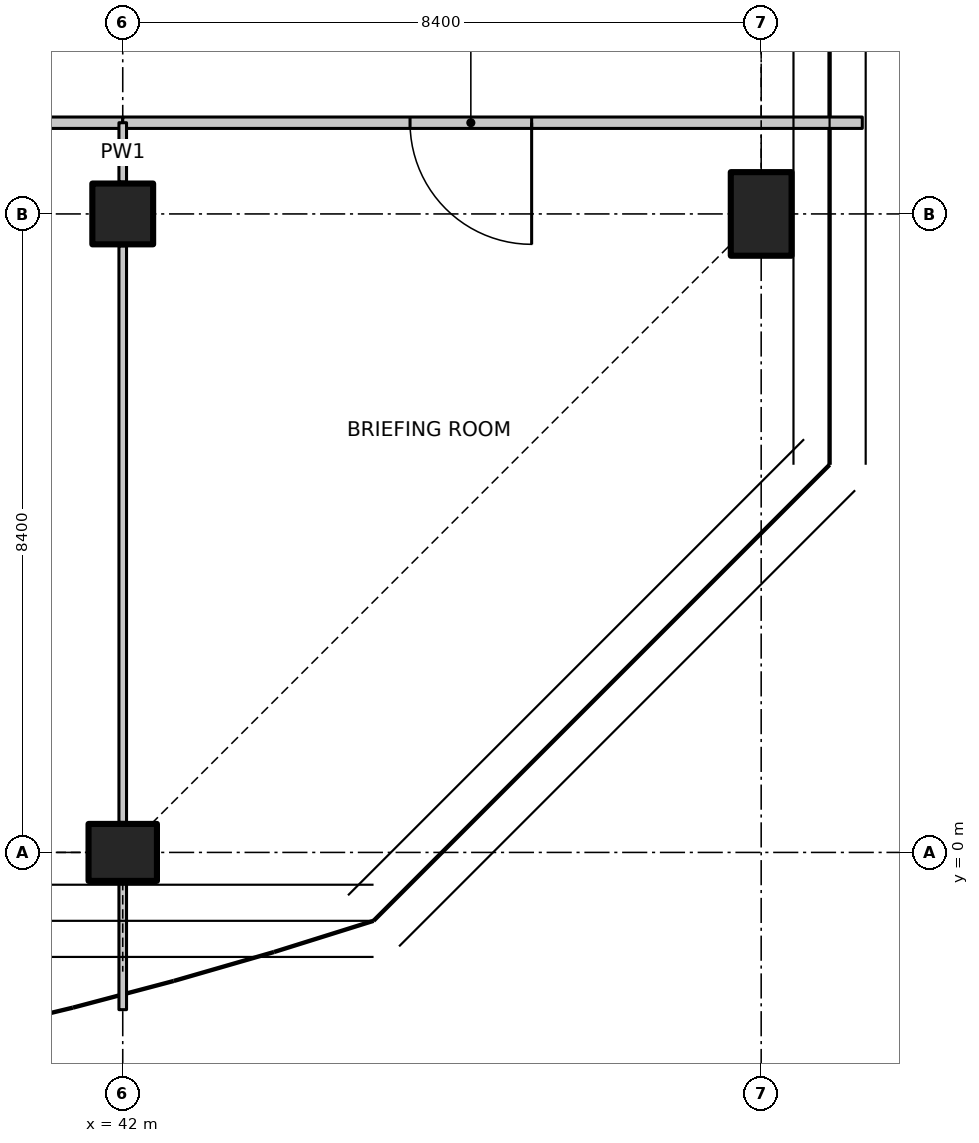
"""IFC4 building model, lengths in metres.
Left out: names, types, materials, properties, quantities, classifications, styles, units other than length and angle.
Written with IfcOpenShell. Run it as: python <this file> out.ifc"""

import sys

from ifc_helpers import new_model, si_unit, direction, frame, frame_2d, origin, origin_2d, place, context, subcontext, project, spatial, polyline, rectangle, outline, extrude, element, fill, save


model = new_model("IFC4")
c1 = context("Model", 3, precision=1e-05, world=origin(), true_north=direction((0.0, 1.0)))
c2 = subcontext(c1, "Body", "Model", "MODEL_VIEW")
j1 = project(units=[si_unit("LENGTHUNIT", "METRE"), si_unit("PLANEANGLEUNIT", "RADIAN")], contexts=[c1])
p1 = place(None, origin())
s1 = spatial("IfcSite", under=j1, at=p1, CompositionType="ELEMENT")
p2 = place(p1, origin())
s2 = spatial("IfcBuilding", under=s1, at=p2, CompositionType="ELEMENT")
p3 = place(p2, frame((0.0, 0.0, 237.3)))
s3 = spatial("IfcBuildingStorey", under=s2, at=p3, CompositionType="ELEMENT", Elevation=237.3)
p4 = place(p3, frame((42.0, 0.0, 0.0), z_axis=(0.0, 0.0, 1.0), x_axis=(0.0, 1.0, 0.0)))
e1 = element("IfcColumn", 1, at=p4, inside=s3, PredefinedType="COLUMN", context=c2, shape_type="SweptSolid", body=[
    extrude(rectangle(XDim=0.75, YDim=0.9, at=origin_2d()), origin(), (0.0, 0.0, 1.0), 3.35),
])
p5 = place(p3, frame((42.0, 8.4, 0.0), z_axis=(0.0, 0.0, 1.0), x_axis=(1.0, 0.0, 0.0)))
e2 = element("IfcColumn", 2, at=p5, inside=s3, PredefinedType="COLUMN", context=c2, shape_type="SweptSolid", body=[
    extrude(rectangle(XDim=0.8, YDim=0.8, at=origin_2d()), origin(), (0.0, 0.0, 1.0), 3.35),
])
p6 = place(p3, frame((50.4, 8.4, 0.0), z_axis=(0.0, 0.0, 1.0), x_axis=(1.0, 0.0, 0.0)))
e3 = element("IfcColumn", 3, at=p6, inside=s3, PredefinedType="COLUMN", context=c2, shape_type="SweptSolid", body=[
    extrude(rectangle(XDim=0.8, YDim=1.1, at=origin_2d()), origin(), (0.0, 0.0, 1.0), 3.35),
])
p7 = place(p3, frame((42.0, 9.6, 0.0), z_axis=(0.0, 0.0, 1.0), x_axis=(-1.0, 0.0, 0.0)))
e4 = element("IfcWall", 4, at=p7, inside=s3, PredefinedType="PARTITIONING", context=c2, shape_type="SweptSolid", body=[
    extrude(rectangle(XDim=8.4, YDim=0.15, at=frame_2d((4.2, 0.0))), origin(), (0.0, 0.0, 1.0), 3.33),
])
p8 = place(p7, frame((3.3, 0.0, 0.0)))
e5 = element("IfcOpeningElement", 5, at=p8, cuts=e4, PredefinedType="OPENING", context=c2, shape_type="SweptSolid", body=[
    extrude(rectangle(XDim=1.6, YDim=2.1, at=frame_2d((0.8, 1.05))), frame((0.0, 0.085, 0.0), z_axis=(0.0, -1.0, 0.0), x_axis=(1.0, 0.0, 0.0)), (0.0, 0.0, 1.0), 0.17),
])
p9 = place(p3, frame((51.73, 9.6, 0.0), z_axis=(0.0, 0.0, 1.0), x_axis=(-1.0, 0.0, 0.0)))
e6 = element("IfcWall", 6, at=p9, inside=s3, PredefinedType="PARTITIONING", context=c2, shape_type="SweptSolid", body=[
    extrude(outline(polyline([(0.0, 0.0), (9.73, 0.0), (9.73, 3.33), (1.781, 3.33), (1.779, 2.98), (0.883, 2.98), (0.881, 3.33), (0.25, 3.33), (0.0, 3.33), (0.0, 0.0)])), frame((0.0, 0.075, 0.0), z_axis=(0.0, -1.0, 0.0), x_axis=(1.0, 0.0, 0.0)), (0.0, 0.0, 1.0), 0.15),
])
p10 = place(p9, frame((4.351, 0.0, 0.0)))
e7 = element("IfcOpeningElement", 7, at=p10, cuts=e6, PredefinedType="OPENING", context=c2, shape_type="SweptSolid", body=[
    extrude(rectangle(XDim=1.6, YDim=2.1, at=frame_2d((0.8, 1.05))), frame((0.0, 0.085, 0.0), z_axis=(0.0, -1.0, 0.0), x_axis=(1.0, 0.0, 0.0)), (0.0, 0.0, 1.0), 0.17),
])
p11 = place(p3, frame((42.0, 9.6, 0.0), z_axis=(0.0, 0.0, 1.0), x_axis=(0.0, -1.0, 0.0)))
e8 = element("IfcWall", 8, at=p11, inside=s3, PredefinedType="PARTITIONING", context=c2, shape_type="SweptSolid", body=[
    extrude(rectangle(XDim=0.78, YDim=0.1, at=frame_2d((0.39, 0.0))), origin(), (0.0, 0.0, 1.0), 3.33),
])
p12 = place(p3, frame((42.0, 7.98, 0.0), z_axis=(0.0, 0.0, 1.0), x_axis=(0.0, -1.0, 0.0)))
e9 = element("IfcWall", 9, at=p12, inside=s3, PredefinedType="PARTITIONING", context=c2, shape_type="SweptSolid", body=[
    extrude(outline(polyline([(0.0, 0.0), (7.585, 0.0), (7.585, 2.98), (7.316, 2.98), (7.314, 3.33), (0.0, 3.33), (0.0, 0.0)])), frame((0.0, 0.05, 0.0), z_axis=(0.0, -1.0, 0.0), x_axis=(1.0, 0.0, 0.0)), (0.0, 0.0, 1.0), 0.1),
])
p13 = place(p3, frame((42.0, -0.395, 0.0), z_axis=(0.0, 0.0, 1.0), x_axis=(0.0, -1.0, 0.0)))
e10 = element("IfcWall", 10, at=p13, inside=s3, PredefinedType="PARTITIONING", context=c2, shape_type="SweptSolid", body=[
    extrude(rectangle(XDim=1.674, YDim=0.1, at=frame_2d((0.837, 0.0))), origin(), (0.0, 0.0, 1.0), 2.98),
])
p14 = place(p10, origin())
e11 = element("IfcDoor", 11, at=p14, inside=s3, OperationType="DOUBLE_DOOR_SINGLE_SWING", PredefinedType="DOOR", context=c2, shape_type="SweptSolid", body=[
    extrude(rectangle(XDim=1.6, YDim=2.1, at=frame_2d((0.8, 1.05))), frame((0.0, 0.025, 0.0), z_axis=(0.0, -1.0, 0.0), x_axis=(1.0, 0.0, 0.0)), (0.0, 0.0, 1.0), 0.05),
])
fill(e7, e11)
save(model, sys.argv[1])
